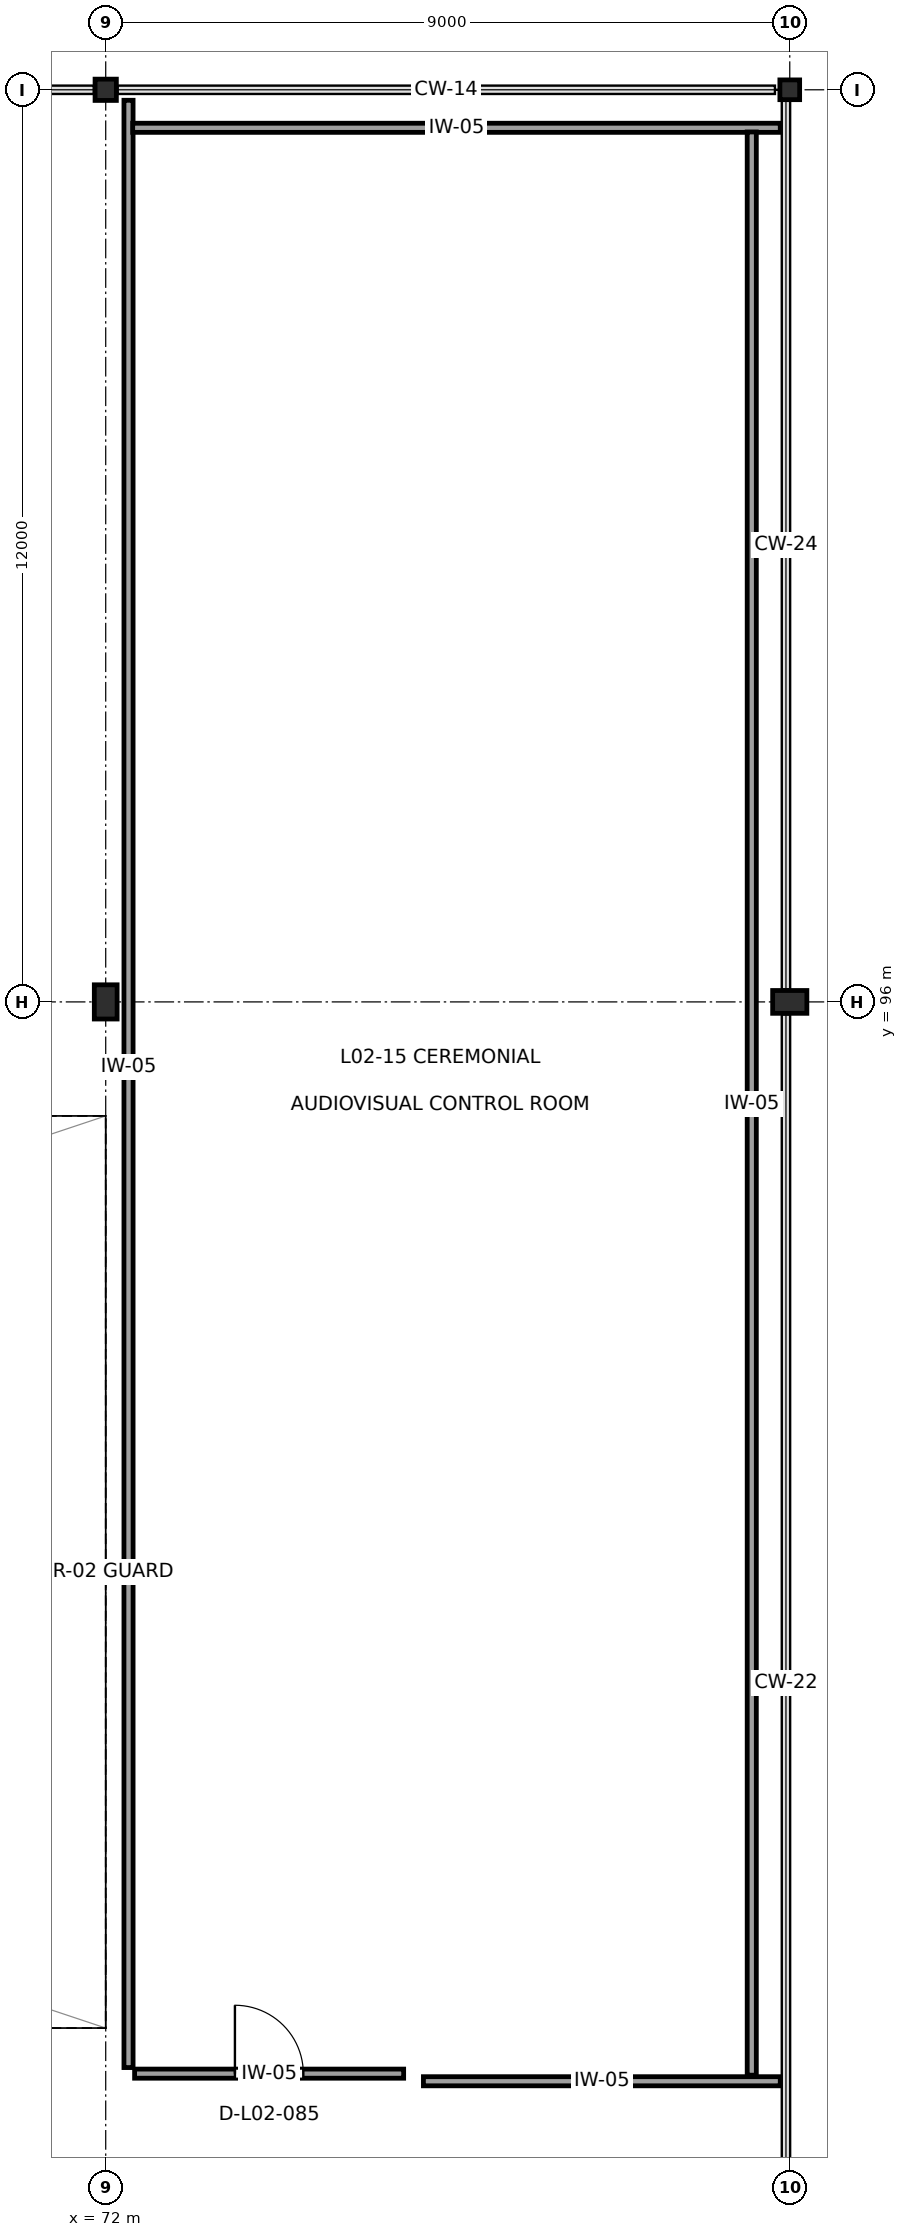
"""IFC4 building model, lengths in metres.
Left out: names, types, materials, properties, quantities, classifications, styles, units other than length and angle.
Written with IfcOpenShell. Run it as: python <this file> out.ifc"""

import sys

from ifc_helpers import new_model, si_unit, direction, frame, frame_2d, origin, origin_2d, place, context, subcontext, project, spatial, rectangle, i_section, extrude, element, fill, save


model = new_model("IFC4")
c1 = context("Model", 3, precision=1e-05, world=origin(), true_north=direction((0.0, 1.0)))
c2 = subcontext(c1, "Body", "Model", "MODEL_VIEW")
j1 = project(units=[si_unit("LENGTHUNIT", "METRE"), si_unit("PLANEANGLEUNIT", "RADIAN")], contexts=[c1])
p1 = place(None, origin())
s1 = spatial("IfcSite", under=j1, at=p1, CompositionType="ELEMENT")
p2 = place(p1, origin())
s2 = spatial("IfcBuilding", under=s1, at=p2, CompositionType="ELEMENT")
p3 = place(p2, frame((0.0, 0.0, 9.9)))
s3 = spatial("IfcBuildingStorey", under=s2, at=p3, CompositionType="ELEMENT", Elevation=9.9)
p4 = place(p3, frame((72.0, 96.0, 0.0), z_axis=(0.0, 0.0, 1.0), x_axis=(1.0, 0.0, 0.0)))
e1 = element("IfcColumn", 1, at=p4, inside=s3, PredefinedType="COLUMN", context=c2, shape_type="SweptSolid", body=[
    extrude(i_section(OverallWidth=0.3, OverallDepth=0.45, WebThickness=0.014, FlangeThickness=0.026, at=origin_2d()), origin(), (0.0, 0.0, 1.0), 4.3),
])
p5 = place(p3, frame((72.0, 108.0, 0.0), z_axis=(0.0, 0.0, 1.0), x_axis=(1.0, 0.0, 0.0)))
e2 = element("IfcColumn", 2, at=p5, inside=s3, PredefinedType="COLUMN", context=c2, shape_type="SweptSolid", body=[
    extrude(i_section(OverallWidth=0.28, OverallDepth=0.28, WebThickness=0.01, FlangeThickness=0.018, at=origin_2d()), origin(), (0.0, 0.0, 1.0), 4.3),
])
p6 = place(p3, frame((81.0, 96.0, 0.0), z_axis=(0.0, 0.0, 1.0), x_axis=(0.0, 1.0, 0.0)))
e3 = element("IfcColumn", 3, at=p6, inside=s3, PredefinedType="COLUMN", context=c2, shape_type="SweptSolid", body=[
    extrude(i_section(OverallWidth=0.3, OverallDepth=0.45, WebThickness=0.014, FlangeThickness=0.026, at=origin_2d()), origin(), (0.0, 0.0, 1.0), 4.3),
])
p7 = place(p3, frame((81.0, 108.0, 0.0), z_axis=(0.0, 0.0, 1.0), x_axis=(1.0, 0.0, 0.0)))
e4 = element("IfcColumn", 4, at=p7, inside=s3, PredefinedType="COLUMN", context=c2, shape_type="SweptSolid", body=[
    extrude(i_section(OverallWidth=0.26, OverallDepth=0.26, WebThickness=0.01, FlangeThickness=0.018, at=origin_2d()), origin(), (0.0, 0.0, 1.0), 4.3),
])
p8 = place(p3, frame((75.92, 81.9, 0.0), z_axis=(0.0, 0.0, 1.0), x_axis=(-1.0, 0.0, 0.0)))
e5 = element("IfcWall", 5, at=p8, inside=s3, PredefinedType="PARTITIONING", context=c2, shape_type="SweptSolid", body=[
    extrude(rectangle(XDim=3.54, YDim=0.12, at=frame_2d((1.77, 0.0))), origin(), (0.0, 0.0, 1.0), 4.14),
])
p9 = place(p8, frame((1.32, 0.0, 0.0)))
e6 = element("IfcOpeningElement", 6, at=p9, cuts=e5, PredefinedType="OPENING", context=c2, shape_type="SweptSolid", body=[
    extrude(rectangle(XDim=0.9, YDim=2.1, at=frame_2d((0.45, 1.05))), frame((0.0, 0.075, 0.0), z_axis=(0.0, -1.0, 0.0), x_axis=(1.0, 0.0, 0.0)), (0.0, 0.0, 1.0), 0.15),
])
p10 = place(p3, frame((72.3, 81.98, 0.0), z_axis=(0.0, 0.0, 1.0), x_axis=(0.0, 1.0, 0.0)))
e7 = element("IfcWall", 7, at=p10, inside=s3, PredefinedType="PARTITIONING", context=c2, shape_type="SweptSolid", body=[
    extrude(rectangle(XDim=25.882, YDim=0.12, at=frame_2d((12.941, 0.0))), origin(), (0.0, 0.0, 1.0), 4.14),
])
p11 = place(p3, frame((72.355, 107.5, 0.0), z_axis=(0.0, 0.0, 1.0), x_axis=(1.0, 0.0, 0.0)))
e8 = element("IfcWall", 8, at=p11, inside=s3, PredefinedType="PARTITIONING", context=c2, shape_type="SweptSolid", body=[
    extrude(rectangle(XDim=8.52, YDim=0.12, at=frame_2d((4.26, 0.0))), origin(), (0.0, 0.0, 1.0), 4.14),
])
p12 = place(p3, frame((80.5, 107.445, 0.0), z_axis=(0.0, 0.0, 1.0), x_axis=(0.0, -1.0, 0.0)))
e9 = element("IfcWall", 9, at=p12, inside=s3, PredefinedType="PARTITIONING", context=c2, shape_type="SweptSolid", body=[
    extrude(rectangle(XDim=25.565, YDim=0.12, at=frame_2d((12.783, 0.0))), origin(), (0.0, 0.0, 1.0), 4.14),
])
p13 = place(p3, frame((80.875, 81.8, 0.0), z_axis=(0.0, 0.0, 1.0), x_axis=(-1.0, 0.0, 0.0)))
e10 = element("IfcWall", 10, at=p13, inside=s3, PredefinedType="PARTITIONING", context=c2, shape_type="SweptSolid", body=[
    extrude(rectangle(XDim=4.695, YDim=0.12, at=frame_2d((2.348, 0.0))), origin(), (0.0, 0.0, 1.0), 4.14),
])
p14 = place(p9, frame((0.9, 0.0, 0.0), z_axis=(0.0, 0.0, 1.0), x_axis=(-1.0, 0.0, 0.0)))
e11 = element("IfcDoor", 11, at=p14, inside=s3, OperationType="SINGLE_SWING_RIGHT", PredefinedType="DOOR", context=c2, shape_type="SweptSolid", body=[
    extrude(rectangle(XDim=0.9, YDim=2.1, at=frame_2d((0.45, 1.05))), frame((0.0, 0.025, 0.0), z_axis=(0.0, -1.0, 0.0), x_axis=(1.0, 0.0, 0.0)), (0.0, 0.0, 1.0), 0.05),
])
fill(e6, e11)
save(model, sys.argv[1])
